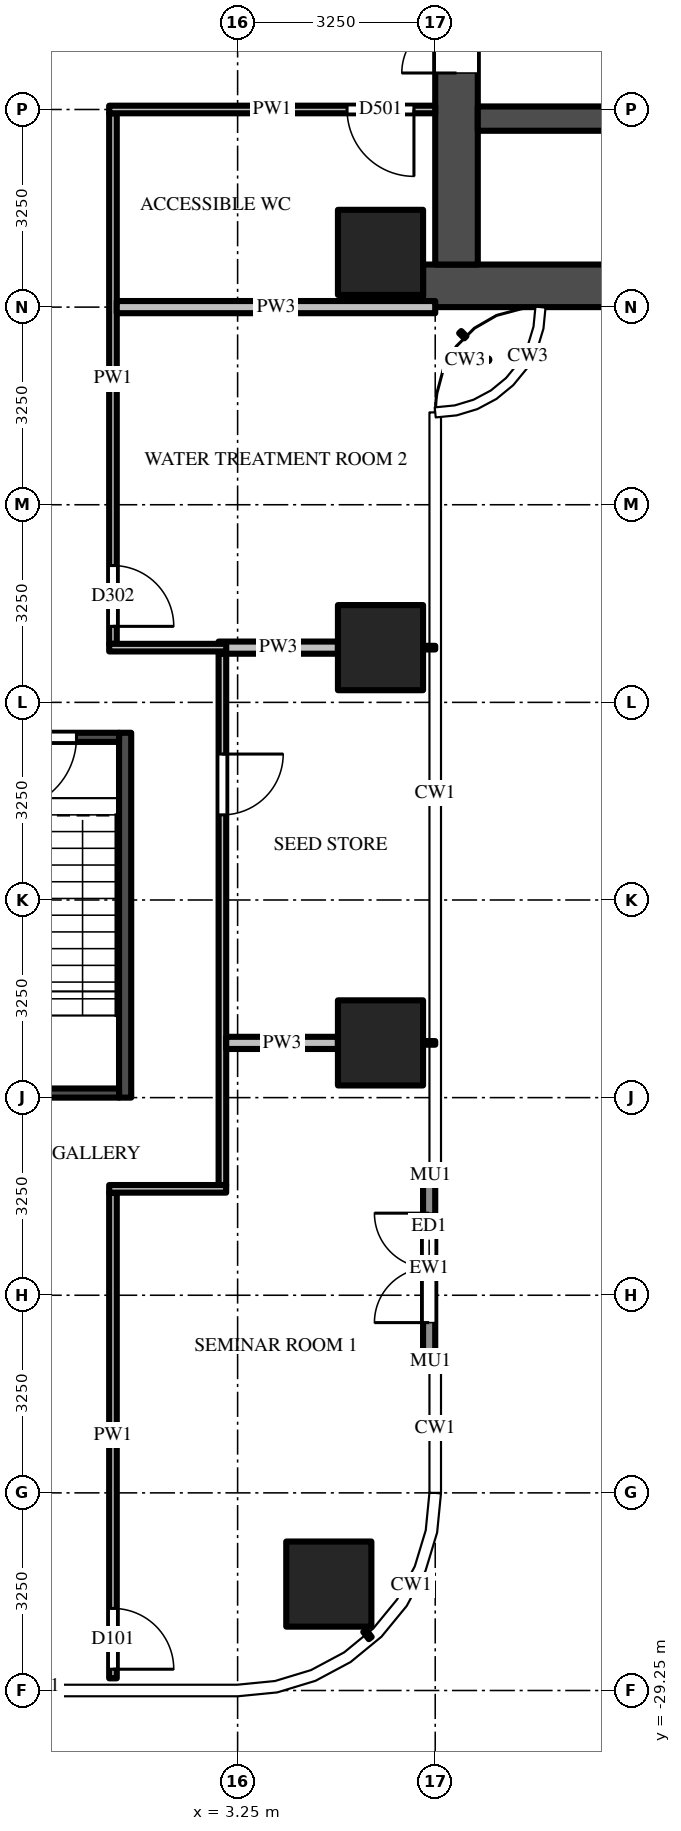
"""IFC4 building model, lengths in metres.
Left out: names, types, materials, properties, quantities, classifications, styles, units other than length and angle.
Written with IfcOpenShell. Run it as: python <this file> out.ifc"""

import sys

from ifc_helpers import new_model, si_unit, direction, frame, frame_2d, origin, origin_2d, place, context, subcontext, project, spatial, rectangle, extrude, source, transform, mapped, element, fill, save


model = new_model("IFC4")
c1 = context("Model", 3, precision=1e-05, world=origin(), true_north=direction((0.0, 1.0)))
c2 = subcontext(c1, "Body", "Model", "MODEL_VIEW")
j1 = project(units=[si_unit("LENGTHUNIT", "METRE"), si_unit("PLANEANGLEUNIT", "RADIAN")], contexts=[c1])
p1 = place(None, origin())
s1 = spatial("IfcSite", under=j1, at=p1, CompositionType="ELEMENT")
p2 = place(p1, origin())
s2 = spatial("IfcBuilding", under=s1, at=p2, CompositionType="ELEMENT")
p3 = place(p2, frame((0.0, 0.0, 74.5)))
s3 = spatial("IfcBuildingStorey", under=s2, at=p3, CompositionType="ELEMENT", Elevation=74.5)
m1 = source(origin(), c2, "Body", "SweptSolid", [
    extrude(rectangle(XDim=1.4, YDim=1.4, at=origin_2d()), origin(), (0.0, 0.0, 1.0), 4.5),
])
for number, where, z_axis, x_axis in (
    (1, (5.6, -5.6, 0.0), (0.0, 0.0, 1.0), (1.0, 0.0, 0.0)),
    (2, (5.6, -12.1, 0.0), (0.0, 0.0, 1.0), (1.0, 0.0, 0.0)),
    (3, (5.6, -18.6, 0.0), (0.0, 0.0, 1.0), (1.0, 0.0, 0.0)),
    (4, (4.75, -27.5, 0.0), (0.0, 0.0, 1.0), (1.0, 0.0, 0.0)),
):
    element("IfcColumn", number, at=place(p3, frame(where, z_axis=z_axis, x_axis=x_axis)), inside=s3, PredefinedType="COLUMN", context=c2, shape_type="MappedRepresentation", body=[
        mapped(m1, transform((0.0, 0.0, 0.0))),
    ])
m2 = source(origin(), c2, "Body", "SweptSolid", [
    extrude(rectangle(XDim=16.45, YDim=0.7, at=frame_2d((8.225, 0.0))), origin(), (0.0, 0.0, 1.0), 4.25),
])
p4 = place(p3, frame((6.3, -6.15, 0.0), z_axis=(0.0, 0.0, 1.0), x_axis=(1.0, 0.0, 0.0)))
e5 = element("IfcWall", 5, at=p4, inside=s3, PredefinedType="SHEAR", context=c2, shape_type="MappedRepresentation", body=[
    mapped(m2, transform((0.0, 0.0, 0.0))),
])
m3 = source(origin(), c2, "Body", "SweptSolid", [
    extrude(rectangle(XDim=9.05, YDim=0.7, at=frame_2d((4.525, 0.0))), origin(), (0.0, 0.0, 1.0), 4.25),
])
p5 = place(p3, frame((6.85, -5.8, 0.0), z_axis=(0.0, 0.0, 1.0), x_axis=(0.0, 1.0, 0.0)))
e6 = element("IfcWall", 6, at=p5, inside=s3, PredefinedType="SHEAR", context=c2, shape_type="MappedRepresentation", body=[
    mapped(m3, transform((0.0, 0.0, 0.0))),
])
m4 = source(origin(), c2, "Body", "SweptSolid", [
    extrude(rectangle(XDim=1.8, YDim=2.1, at=frame_2d((0.9, 1.05))), frame((0.0, 0.36, 0.0), z_axis=(0.0, -1.0, 0.0), x_axis=(1.0, 0.0, 0.0)), (0.0, 0.0, 1.0), 0.72),
])
p6 = place(p5, frame((3.15, 0.0, 0.0)))
e7 = element("IfcOpeningElement", 7, at=p6, cuts=e6, PredefinedType="OPENING", context=c2, shape_type="MappedRepresentation", body=[
    mapped(m4, transform((0.0, 0.0, 0.0))),
])
m5 = source(origin(), c2, "Body", "SweptSolid", [
    extrude(rectangle(XDim=7.5, YDim=0.4, at=frame_2d((3.75, 0.0))), origin(), (0.0, 0.0, 1.0), 4.25),
])
p7 = place(p3, frame((7.2, -3.4, 0.0), z_axis=(0.0, 0.0, 1.0), x_axis=(1.0, 0.0, 0.0)))
e8 = element("IfcWall", 8, at=p7, inside=s3, PredefinedType="SHEAR", context=c2, shape_type="MappedRepresentation", body=[
    mapped(m5, transform((0.0, 0.0, 0.0))),
])
m6 = source(origin(), c2, "Body", "SweptSolid", [
    extrude(rectangle(XDim=1.1, YDim=2.1, at=frame_2d((0.55, 1.05))), frame((0.0, 0.21, 0.0), z_axis=(0.0, -1.0, 0.0), x_axis=(1.0, 0.0, 0.0)), (0.0, 0.0, 1.0), 0.42),
])
p8 = place(p7, frame((3.0, 0.0, 0.0)))
e9 = element("IfcOpeningElement", 9, at=p8, cuts=e8, PredefinedType="OPENING", context=c2, shape_type="MappedRepresentation", body=[
    mapped(m6, transform((0.0, 0.0, 0.0))),
])
p9 = place(p7, frame((5.5, 0.0, 0.0)))
e10 = element("IfcOpeningElement", 10, at=p9, cuts=e8, PredefinedType="OPENING", context=c2, shape_type="MappedRepresentation", body=[
    mapped(m6, transform((0.0, 0.0, 0.0))),
])
m7 = source(origin(), c2, "Body", "SweptSolid", [
    extrude(rectangle(XDim=6.0, YDim=0.2, at=frame_2d((3.0, 0.0))), origin(), (0.0, 0.0, 1.0), 4.25),
])
p10 = place(p3, frame((1.4, -13.5, 0.0), z_axis=(0.0, 0.0, 1.0), x_axis=(0.0, -1.0, 0.0)))
e11 = element("IfcWall", 11, at=p10, inside=s3, PredefinedType="SHEAR", context=c2, shape_type="MappedRepresentation", body=[
    mapped(m7, transform((0.0, 0.0, 0.0))),
])
m8 = source(origin(), c2, "Body", "SweptSolid", [
    extrude(rectangle(XDim=2.6, YDim=0.15, at=frame_2d((1.3, 0.0))), origin(), (0.0, 0.0, 1.0), 4.25),
])
p11 = place(p3, frame((1.3, -13.575, 0.0), z_axis=(0.0, 0.0, 1.0), x_axis=(-1.0, 0.0, 0.0)))
e12 = element("IfcWall", 12, at=p11, inside=s3, PredefinedType="SHEAR", context=c2, shape_type="MappedRepresentation", body=[
    mapped(m8, transform((0.0, 0.0, 0.0))),
])
m9 = source(origin(), c2, "Body", "SweptSolid", [
    extrude(rectangle(XDim=1.2, YDim=2.1, at=frame_2d((0.6, 1.05))), frame((0.0, 0.085, 0.0), z_axis=(0.0, -1.0, 0.0), x_axis=(1.0, 0.0, 0.0)), (0.0, 0.0, 1.0), 0.17),
])
p12 = place(p11, frame((0.7, 0.0, 0.0)))
e13 = element("IfcOpeningElement", 13, at=p12, cuts=e12, PredefinedType="OPENING", context=c2, shape_type="MappedRepresentation", body=[
    mapped(m9, transform((0.0, 0.0, 0.0))),
])
p13 = place(p3, frame((1.3, -19.425, 0.0), z_axis=(0.0, 0.0, 1.0), x_axis=(-1.0, 0.0, 0.0)))
e14 = element("IfcWall", 14, at=p13, inside=s3, PredefinedType="SHEAR", context=c2, shape_type="MappedRepresentation", body=[
    mapped(m8, transform((0.0, 0.0, 0.0))),
])
m10 = source(origin(), c2, "Body", "SweptSolid", [
    extrude(rectangle(XDim=3.0, YDim=0.2, at=frame_2d((1.5, 0.0))), origin(), (0.0, 0.0, 1.0), 4.25),
])
p14 = place(p3, frame((6.4, -23.8, 0.0), z_axis=(0.0, 0.0, 1.0), x_axis=(0.0, 1.0, 0.0)))
e15 = element("IfcWall", 15, at=p14, inside=s3, PredefinedType="SOLIDWALL", context=c2, shape_type="MappedRepresentation", body=[
    mapped(m10, transform((0.0, 0.0, 0.0))),
])
m11 = source(origin(), c2, "Body", "SweptSolid", [
    extrude(rectangle(XDim=1.8, YDim=2.4, at=frame_2d((0.9, 1.2))), frame((0.0, 0.11, 0.0), z_axis=(0.0, -1.0, 0.0), x_axis=(1.0, 0.0, 0.0)), (0.0, 0.0, 1.0), 0.22),
])
p15 = place(p14, frame((0.6, 0.0, 0.0)))
e16 = element("IfcOpeningElement", 16, at=p15, cuts=e15, PredefinedType="OPENING", context=c2, shape_type="MappedRepresentation", body=[
    mapped(m11, transform((0.0, 0.0, 0.0))),
])
m12 = source(origin(), c2, "Body", "SweptSolid", [
    extrude(rectangle(XDim=7.988, YDim=0.125, at=frame_2d((3.994, 0.0))), origin(), (0.0, 0.0, 1.0), 3.33),
])
p16 = place(p3, frame((1.2, -21.062, 0.0), z_axis=(0.0, 0.0, 1.0), x_axis=(0.0, -1.0, 0.0)))
e17 = element("IfcWall", 17, at=p16, inside=s3, PredefinedType="PARTITIONING", context=c2, shape_type="MappedRepresentation", body=[
    mapped(m12, transform((0.0, 0.0, 0.0))),
])
m13 = source(origin(), c2, "Body", "SweptSolid", [
    extrude(rectangle(XDim=1.0, YDim=2.1, at=frame_2d((0.5, 1.05))), frame((0.0, 0.073, 0.0), z_axis=(0.0, -1.0, 0.0), x_axis=(1.0, 0.0, 0.0)), (0.0, 0.0, 1.0), 0.145),
])
p17 = place(p16, frame((6.837, 0.0, 0.0)))
e18 = element("IfcOpeningElement", 18, at=p17, cuts=e17, PredefinedType="OPENING", context=c2, shape_type="MappedRepresentation", body=[
    mapped(m13, transform((0.0, 0.0, 0.0))),
])
m14 = source(origin(), c2, "Body", "SweptSolid", [
    extrude(rectangle(XDim=8.725, YDim=0.125, at=frame_2d((4.363, 0.0))), origin(), (0.0, 0.0, 1.0), 3.468),
])
p18 = place(p3, frame((1.2, -3.312, 0.0), z_axis=(0.0, 0.0, 1.0), x_axis=(0.0, -1.0, 0.0)))
e19 = element("IfcWall", 19, at=p18, inside=s3, PredefinedType="PARTITIONING", context=c2, shape_type="MappedRepresentation", body=[
    mapped(m14, transform((0.0, 0.0, 0.0))),
])
p19 = place(p18, frame((7.438, 0.0, 0.0)))
e20 = element("IfcOpeningElement", 20, at=p19, cuts=e19, PredefinedType="OPENING", context=c2, shape_type="MappedRepresentation", body=[
    mapped(m13, transform((0.0, 0.0, 0.0))),
])
m15 = source(origin(), c2, "Body", "SweptSolid", [
    extrude(rectangle(XDim=8.738, YDim=0.125, at=frame_2d((4.369, 0.0))), origin(), (0.0, 0.0, 1.0), 3.468),
])
p20 = place(p3, frame((3.0, -12.2, 0.0), z_axis=(0.0, 0.0, 1.0), x_axis=(0.0, -1.0, 0.0)))
e21 = element("IfcWall", 21, at=p20, inside=s3, PredefinedType="PARTITIONING", context=c2, shape_type="MappedRepresentation", body=[
    mapped(m15, transform((0.0, 0.0, 0.0))),
])
p21 = place(p20, frame((1.65, 0.0, 0.0)))
e22 = element("IfcOpeningElement", 22, at=p21, cuts=e21, PredefinedType="OPENING", context=c2, shape_type="MappedRepresentation", body=[
    mapped(m13, transform((0.0, 0.0, 0.0))),
])
m16 = source(origin(), c2, "Body", "SweptSolid", [
    extrude(rectangle(XDim=1.925, YDim=0.125, at=frame_2d((0.962, 0.0))), origin(), (0.0, 0.0, 1.0), 4.25),
])
p22 = place(p3, frame((3.062, -21.0, 0.0), z_axis=(0.0, 0.0, 1.0), x_axis=(-1.0, 0.0, 0.0)))
e23 = element("IfcWall", 23, at=p22, inside=s3, PredefinedType="PARTITIONING", context=c2, shape_type="MappedRepresentation", body=[
    mapped(m16, transform((0.0, 0.0, 0.0))),
])
m17 = source(origin(), c2, "Body", "SweptSolid", [
    extrude(rectangle(XDim=1.837, YDim=0.2, at=frame_2d((0.919, 0.0))), origin(), (0.0, 0.0, 1.0), 3.697),
])
p23 = place(p3, frame((3.062, -18.6, 0.0), z_axis=(0.0, 0.0, 1.0), x_axis=(1.0, 0.0, 0.0)))
e24 = element("IfcWall", 24, at=p23, inside=s3, PredefinedType="PARTITIONING", context=c2, shape_type="MappedRepresentation", body=[
    mapped(m17, transform((0.0, 0.0, 0.0))),
])
m18 = source(origin(), c2, "Body", "SweptSolid", [
    extrude(rectangle(XDim=1.962, YDim=0.2, at=frame_2d((0.981, 0.0))), origin(), (0.0, 0.0, 1.0), 3.468),
])
p24 = place(p3, frame((2.938, -12.1, 0.0), z_axis=(0.0, 0.0, 1.0), x_axis=(1.0, 0.0, 0.0)))
e25 = element("IfcWall", 25, at=p24, inside=s3, PredefinedType="PARTITIONING", context=c2, shape_type="MappedRepresentation", body=[
    mapped(m18, transform((0.0, 0.0, 0.0))),
])
m19 = source(origin(), c2, "Body", "SweptSolid", [
    extrude(rectangle(XDim=1.925, YDim=0.125, at=frame_2d((0.962, 0.0))), origin(), (0.0, 0.0, 1.0), 3.468),
])
p25 = place(p3, frame((1.137, -12.1, 0.0), z_axis=(0.0, 0.0, 1.0), x_axis=(1.0, 0.0, 0.0)))
e26 = element("IfcWall", 26, at=p25, inside=s3, PredefinedType="PARTITIONING", context=c2, shape_type="MappedRepresentation", body=[
    mapped(m19, transform((0.0, 0.0, 0.0))),
])
m20 = source(origin(), c2, "Body", "SweptSolid", [
    extrude(rectangle(XDim=5.238, YDim=0.2, at=frame_2d((2.619, 0.0))), origin(), (0.0, 0.0, 1.0), 3.33),
])
p26 = place(p3, frame((1.262, -6.5, 0.0), z_axis=(0.0, 0.0, 1.0), x_axis=(1.0, 0.0, 0.0)))
e27 = element("IfcWall", 27, at=p26, inside=s3, PredefinedType="PARTITIONING", context=c2, shape_type="MappedRepresentation", body=[
    mapped(m20, transform((0.0, 0.0, 0.0))),
])
m21 = source(origin(), c2, "Body", "SweptSolid", [
    extrude(rectangle(XDim=5.363, YDim=0.125, at=frame_2d((2.681, 0.0))), origin(), (0.0, 0.0, 1.0), 3.468),
])
p27 = place(p3, frame((6.5, -3.25, 0.0), z_axis=(0.0, 0.0, 1.0), x_axis=(-1.0, 0.0, 0.0)))
e28 = element("IfcWall", 28, at=p27, inside=s3, PredefinedType="PARTITIONING", context=c2, shape_type="MappedRepresentation", body=[
    mapped(m21, transform((0.0, 0.0, 0.0))),
])
m22 = source(origin(), c2, "Body", "SweptSolid", [
    extrude(rectangle(XDim=1.1, YDim=2.1, at=frame_2d((0.55, 1.05))), frame((0.0, 0.073, 0.0), z_axis=(0.0, -1.0, 0.0), x_axis=(1.0, 0.0, 0.0)), (0.0, 0.0, 1.0), 0.145),
])
p28 = place(p27, frame((0.35, 0.0, 0.0)))
e29 = element("IfcOpeningElement", 29, at=p28, cuts=e28, PredefinedType="OPENING", context=c2, shape_type="MappedRepresentation", body=[
    mapped(m22, transform((0.0, 0.0, 0.0))),
])
m23 = source(origin(), c2, "Body", "SweptSolid", [
    extrude(rectangle(XDim=1.8, YDim=2.1, at=frame_2d((0.9, 1.05))), frame((0.0, -0.275, 0.0), z_axis=(0.0, -1.0, 0.0), x_axis=(1.0, 0.0, 0.0)), (0.0, 0.0, 1.0), 0.05),
])
p29 = place(p6, origin())
e30 = element("IfcDoor", 30, at=p29, inside=s3, OperationType="DOUBLE_DOOR_SINGLE_SWING", PredefinedType="DOOR", context=c2, shape_type="MappedRepresentation", body=[
    mapped(m23, transform((0.0, 0.0, 0.0))),
])
fill(e7, e30)
m24 = source(origin(), c2, "Body", "SweptSolid", [
    extrude(rectangle(XDim=1.2, YDim=2.1, at=frame_2d((0.6, 1.05))), frame((0.0, 0.025, 0.0), z_axis=(0.0, -1.0, 0.0), x_axis=(1.0, 0.0, 0.0)), (0.0, 0.0, 1.0), 0.05),
])
p30 = place(p12, origin())
e31 = element("IfcDoor", 31, at=p30, inside=s3, OperationType="SINGLE_SWING_RIGHT", PredefinedType="DOOR", context=c2, shape_type="MappedRepresentation", body=[
    mapped(m24, transform((0.0, 0.0, 0.0))),
])
fill(e13, e31)
m25 = source(origin(), c2, "Body", "SweptSolid", [
    extrude(rectangle(XDim=1.8, YDim=2.4, at=frame_2d((0.9, 1.2))), frame((0.0, 0.025, 0.0), z_axis=(0.0, -1.0, 0.0), x_axis=(1.0, 0.0, 0.0)), (0.0, 0.0, 1.0), 0.05),
])
p31 = place(p15, origin())
e32 = element("IfcDoor", 32, at=p31, inside=s3, OperationType="DOUBLE_DOOR_SINGLE_SWING", PredefinedType="DOOR", context=c2, shape_type="MappedRepresentation", body=[
    mapped(m25, transform((0.0, 0.0, 0.0))),
])
fill(e16, e32)
m26 = source(origin(), c2, "Body", "SweptSolid", [
    extrude(rectangle(XDim=1.0, YDim=2.1, at=frame_2d((0.5, 1.05))), frame((0.0, 0.025, 0.0), z_axis=(0.0, -1.0, 0.0), x_axis=(1.0, 0.0, 0.0)), (0.0, 0.0, 1.0), 0.05),
])
p32 = place(p17, origin())
e33 = element("IfcDoor", 33, at=p32, inside=s3, OperationType="SINGLE_SWING_RIGHT", PredefinedType="DOOR", context=c2, shape_type="MappedRepresentation", body=[
    mapped(m26, transform((0.0, 0.0, 0.0))),
])
fill(e18, e33)
p33 = place(p21, origin())
e34 = element("IfcDoor", 34, at=p33, inside=s3, OperationType="SINGLE_SWING_LEFT", PredefinedType="DOOR", context=c2, shape_type="MappedRepresentation", body=[
    mapped(m26, transform((0.0, 0.0, 0.0))),
])
fill(e22, e34)
p34 = place(p19, origin())
e35 = element("IfcDoor", 35, at=p34, inside=s3, OperationType="SINGLE_SWING_RIGHT", PredefinedType="DOOR", context=c2, shape_type="MappedRepresentation", body=[
    mapped(m26, transform((0.0, 0.0, 0.0))),
])
fill(e20, e35)
m27 = source(origin(), c2, "Body", "SweptSolid", [
    extrude(rectangle(XDim=1.1, YDim=2.1, at=frame_2d((0.55, 1.05))), frame((0.0, 0.025, 0.0), z_axis=(0.0, -1.0, 0.0), x_axis=(1.0, 0.0, 0.0)), (0.0, 0.0, 1.0), 0.05),
])
p35 = place(p28, origin())
e36 = element("IfcDoor", 36, at=p35, inside=s3, OperationType="SINGLE_SWING_LEFT", PredefinedType="DOOR", context=c2, shape_type="MappedRepresentation", body=[
    mapped(m27, transform((0.0, 0.0, 0.0))),
])
fill(e29, e36)
save(model, sys.argv[1])
